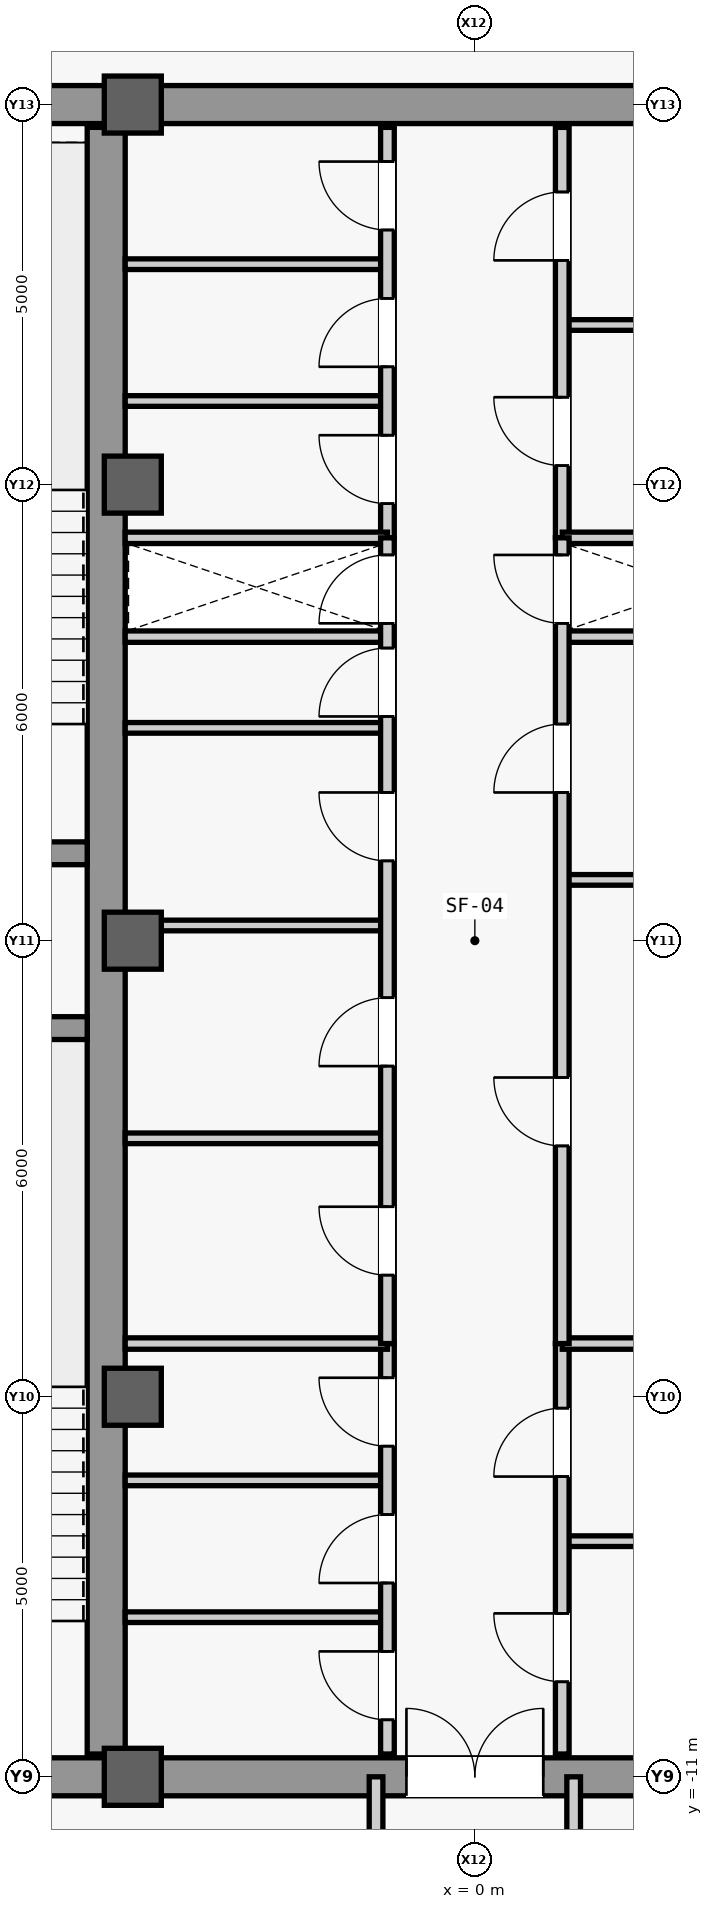
"""IFC4 building model, lengths in metres.
Left out: names, types, materials, properties, quantities, classifications, styles, units other than length and angle.
Written with IfcOpenShell. Run it as: python <this file> out.ifc"""

import sys

from ifc_helpers import new_model, si_unit, direction, frame, frame_2d, origin, origin_2d, place, context, subcontext, project, spatial, rectangle, extrude, source, transform, mapped, element, fill, save


model = new_model("IFC4")
c1 = context("Model", 3, precision=1e-05, world=origin(), true_north=direction((0.0, 1.0)))
c2 = subcontext(c1, "Body", "Model", "MODEL_VIEW")
j1 = project(units=[si_unit("LENGTHUNIT", "METRE"), si_unit("PLANEANGLEUNIT", "RADIAN")], contexts=[c1])
p1 = place(None, origin())
s1 = spatial("IfcSite", under=j1, at=p1, CompositionType="ELEMENT")
p2 = place(p1, origin())
s2 = spatial("IfcBuilding", under=s1, at=p2, CompositionType="ELEMENT")
p3 = place(p2, frame((0.0, 0.0, 358.3)))
s3 = spatial("IfcBuildingStorey", under=s2, at=p3, CompositionType="ELEMENT", Elevation=358.3)
m1 = source(origin(), c2, "Body", "SweptSolid", [
    extrude(rectangle(XDim=21.4, YDim=0.5, at=frame_2d((10.7, 0.0))), origin(), (0.0, 0.0, 1.0), 3.74),
])
p4 = place(p3, frame((-4.85, -10.7, 0.0), z_axis=(0.0, 0.0, 1.0), x_axis=(0.0, 1.0, 0.0)))
e1 = element("IfcWall", 1, at=p4, inside=s3, PredefinedType="SHEAR", context=c2, shape_type="MappedRepresentation", body=[
    mapped(m1, transform((0.0, 0.0, 0.0), scale=1.0)),
])
m2 = source(origin(), c2, "Body", "SweptSolid", [
    extrude(rectangle(XDim=5.9, YDim=0.5, at=frame_2d((2.95, 0.0))), origin(), (0.0, 0.0, 1.0), 3.74),
])
for number, where, z_axis, x_axis in (
    (2, (-10.75, -11.0, 0.0), (0.0, 0.0, 1.0), (1.0, 0.0, 0.0)),
    (3, (-10.75, 11.0, 0.0), (0.0, 0.0, 1.0), (1.0, 0.0, 0.0)),
):
    element("IfcWall", number, at=place(p3, frame(where, z_axis=z_axis, x_axis=x_axis)), inside=s3, PredefinedType="SHEAR", context=c2, shape_type="MappedRepresentation", body=[
        mapped(m2, transform((0.0, 0.0, 0.0), scale=1.0)),
    ])
m3 = source(origin(), c2, "Body", "SweptSolid", [
    extrude(rectangle(XDim=5.65, YDim=0.3, at=frame_2d((2.825, 0.0))), origin(), (0.0, 0.0, 1.0), 3.74),
])
for number, where, z_axis, x_axis in (
    (4, (-10.75, -1.15, 0.0), (0.0, 0.0, 1.0), (1.0, 0.0, 0.0)),
    (5, (-10.75, 1.15, 0.0), (0.0, 0.0, 1.0), (1.0, 0.0, 0.0)),
):
    element("IfcWall", number, at=place(p3, frame(where, z_axis=z_axis, x_axis=x_axis)), inside=s3, PredefinedType="SHEAR", context=c2, shape_type="MappedRepresentation", body=[
        mapped(m3, transform((0.0, 0.0, 0.0), scale=1.0)),
    ])
m4 = source(origin(), c2, "Body", "SweptSolid", [
    extrude(rectangle(XDim=9.2, YDim=0.5, at=frame_2d((4.6, 0.0))), origin(), (0.0, 0.0, 1.0), 3.74),
])
p5 = place(p3, frame((-4.6, -11.0, 0.0), z_axis=(0.0, 0.0, 1.0), x_axis=(1.0, 0.0, 0.0)))
e6 = element("IfcWall", 6, at=p5, inside=s3, PredefinedType="SHEAR", context=c2, shape_type="MappedRepresentation", body=[
    mapped(m4, transform((0.0, 0.0, 0.0), scale=1.0)),
])
m5 = source(origin(), c2, "Body", "SweptSolid", [
    extrude(rectangle(XDim=1.8, YDim=2.25, at=frame_2d((0.9, 1.125))), frame((0.0, 0.26, 0.0), z_axis=(0.0, -1.0, 0.0), x_axis=(1.0, 0.0, 0.0)), (0.0, 0.0, 1.0), 0.52),
])
p6 = place(p5, frame((3.7, 0.0, 0.0)))
e7 = element("IfcOpeningElement", 7, at=p6, cuts=e6, PredefinedType="OPENING", context=c2, shape_type="MappedRepresentation", body=[
    mapped(m5, transform((0.0, 0.0, 0.0), scale=1.0)),
])
p7 = place(p3, frame((-4.6, 11.0, 0.0), z_axis=(0.0, 0.0, 1.0), x_axis=(1.0, 0.0, 0.0)))
e8 = element("IfcWall", 8, at=p7, inside=s3, PredefinedType="SHEAR", context=c2, shape_type="MappedRepresentation", body=[
    mapped(m4, transform((0.0, 0.0, 0.0), scale=1.0)),
])
m6 = source(origin(), c2, "Body", "SweptSolid", [
    extrude(rectangle(XDim=0.75, YDim=0.75, at=origin_2d()), origin(), (0.0, 0.0, 1.0), 4.0),
])
for number, where, z_axis, x_axis in (
    (9, (-4.5, -11.0, 0.0), (0.0, 0.0, 1.0), (1.0, 0.0, 0.0)),
    (10, (-4.5, -6.0, 0.0), (0.0, 0.0, 1.0), (1.0, 0.0, 0.0)),
    (11, (-4.5, 0.0, 0.0), (0.0, 0.0, 1.0), (1.0, 0.0, 0.0)),
    (12, (-4.5, 6.0, 0.0), (0.0, 0.0, 1.0), (1.0, 0.0, 0.0)),
    (13, (-4.5, 11.0, 0.0), (0.0, 0.0, 1.0), (1.0, 0.0, 0.0)),
):
    element("IfcColumn", number, at=place(p3, frame(where, z_axis=z_axis, x_axis=x_axis)), inside=s3, PredefinedType="COLUMN", context=c2, shape_type="MappedRepresentation", body=[
        mapped(m6, transform((0.0, 0.0, 0.0), scale=1.0)),
    ])
m7 = source(origin(), c2, "Body", "SweptSolid", [
    extrude(rectangle(XDim=3.45, YDim=0.15, at=frame_2d((1.725, 0.0))), origin(), (0.0, 0.0, 1.0), 3.74),
])
for number, where, z_axis, x_axis in (
    (14, (-4.6, 4.0, 0.0), (0.0, 0.0, 1.0), (1.0, 0.0, 0.0)),
    (15, (1.15, 4.0, 0.0), (0.0, 0.0, 1.0), (1.0, 0.0, 0.0)),
):
    element("IfcWall", number, at=place(p3, frame(where, z_axis=z_axis, x_axis=x_axis)), inside=s3, PredefinedType="PARTITIONING", context=c2, shape_type="MappedRepresentation", body=[
        mapped(m7, transform((0.0, 0.0, 0.0), scale=1.0)),
    ])
m8 = source(origin(), c2, "Body", "SweptSolid", [
    extrude(rectangle(XDim=3.45, YDim=0.14, at=frame_2d((1.725, 0.0))), origin(), (0.0, 0.0, 1.0), 3.74),
])
for number, where, z_axis, x_axis in (
    (16, (-4.6, -8.9, 0.0), (0.0, 0.0, 1.0), (1.0, 0.0, 0.0)),
    (17, (-4.6, -7.1, 0.0), (0.0, 0.0, 1.0), (1.0, 0.0, 0.0)),
):
    element("IfcWall", number, at=place(p3, frame(where, z_axis=z_axis, x_axis=x_axis)), inside=s3, PredefinedType="PARTITIONING", context=c2, shape_type="MappedRepresentation", body=[
        mapped(m8, transform((0.0, 0.0, 0.0), scale=1.0)),
    ])
m9 = source(origin(), c2, "Body", "SweptSolid", [
    extrude(rectangle(XDim=5.4, YDim=0.18, at=frame_2d((2.7, 0.0))), origin(), (0.0, 0.0, 1.0), 3.74),
])
p8 = place(p3, frame((-1.15, -10.7, 0.0), z_axis=(0.0, 0.0, 1.0), x_axis=(0.0, 1.0, 0.0)))
e18 = element("IfcWall", 18, at=p8, inside=s3, PredefinedType="PARTITIONING", context=c2, shape_type="MappedRepresentation", body=[
    mapped(m9, transform((0.0, 0.0, 0.0), scale=1.0)),
])
m10 = source(origin(), c2, "Body", "SweptSolid", [
    extrude(rectangle(XDim=0.9, YDim=2.15, at=frame_2d((0.45, 1.075))), frame((0.0, 0.1, 0.0), z_axis=(0.0, -1.0, 0.0), x_axis=(1.0, 0.0, 0.0)), (0.0, 0.0, 1.0), 0.2),
])
p9 = place(p8, frame((0.45, 0.0, 0.0)))
e19 = element("IfcOpeningElement", 19, at=p9, cuts=e18, PredefinedType="OPENING", context=c2, shape_type="MappedRepresentation", body=[
    mapped(m10, transform((0.0, 0.0, 0.0), scale=1.0)),
])
p10 = place(p8, frame((2.25, 0.0, 0.0)))
e20 = element("IfcOpeningElement", 20, at=p10, cuts=e18, PredefinedType="OPENING", context=c2, shape_type="MappedRepresentation", body=[
    mapped(m10, transform((0.0, 0.0, 0.0), scale=1.0)),
])
p11 = place(p8, frame((4.05, 0.0, 0.0)))
e21 = element("IfcOpeningElement", 21, at=p11, cuts=e18, PredefinedType="OPENING", context=c2, shape_type="MappedRepresentation", body=[
    mapped(m10, transform((0.0, 0.0, 0.0), scale=1.0)),
])
p12 = place(p3, frame((1.15, -7.9, 0.0), z_axis=(0.0, 0.0, 1.0), x_axis=(1.0, 0.0, 0.0)))
e22 = element("IfcWall", 22, at=p12, inside=s3, PredefinedType="PARTITIONING", context=c2, shape_type="MappedRepresentation", body=[
    mapped(m8, transform((0.0, 0.0, 0.0), scale=1.0)),
])
p13 = place(p3, frame((1.15, -10.7, 0.0), z_axis=(0.0, 0.0, 1.0), x_axis=(0.0, 1.0, 0.0)))
e23 = element("IfcWall", 23, at=p13, inside=s3, PredefinedType="PARTITIONING", context=c2, shape_type="MappedRepresentation", body=[
    mapped(m9, transform((0.0, 0.0, 0.0), scale=1.0)),
])
p14 = place(p13, frame((0.95, 0.0, 0.0)))
e24 = element("IfcOpeningElement", 24, at=p14, cuts=e23, PredefinedType="OPENING", context=c2, shape_type="MappedRepresentation", body=[
    mapped(m10, transform((0.0, 0.0, 0.0), scale=1.0)),
])
p15 = place(p13, frame((3.65, 0.0, 0.0)))
e25 = element("IfcOpeningElement", 25, at=p15, cuts=e23, PredefinedType="OPENING", context=c2, shape_type="MappedRepresentation", body=[
    mapped(m10, transform((0.0, 0.0, 0.0), scale=1.0)),
])
for number, where, z_axis, x_axis in (
    (26, (-4.6, -5.3, 0.0), (0.0, 0.0, 1.0), (1.0, 0.0, 0.0)),
    (27, (1.15, -5.3, 0.0), (0.0, 0.0, 1.0), (1.0, 0.0, 0.0)),
):
    element("IfcWall", number, at=place(p3, frame(where, z_axis=z_axis, x_axis=x_axis)), inside=s3, PredefinedType="PARTITIONING", context=c2, shape_type="MappedRepresentation", body=[
        mapped(m7, transform((0.0, 0.0, 0.0), scale=1.0)),
    ])
for number, where, z_axis, x_axis in (
    (28, (-4.6, 7.1, 0.0), (0.0, 0.0, 1.0), (1.0, 0.0, 0.0)),
    (29, (-4.6, 8.9, 0.0), (0.0, 0.0, 1.0), (1.0, 0.0, 0.0)),
):
    element("IfcWall", number, at=place(p3, frame(where, z_axis=z_axis, x_axis=x_axis)), inside=s3, PredefinedType="PARTITIONING", context=c2, shape_type="MappedRepresentation", body=[
        mapped(m8, transform((0.0, 0.0, 0.0), scale=1.0)),
    ])
p16 = place(p3, frame((-1.15, 5.3, 0.0), z_axis=(0.0, 0.0, 1.0), x_axis=(0.0, 1.0, 0.0)))
e30 = element("IfcWall", 30, at=p16, inside=s3, PredefinedType="PARTITIONING", context=c2, shape_type="MappedRepresentation", body=[
    mapped(m9, transform((0.0, 0.0, 0.0), scale=1.0)),
])
p17 = place(p16, frame((0.45, 0.0, 0.0)))
e31 = element("IfcOpeningElement", 31, at=p17, cuts=e30, PredefinedType="OPENING", context=c2, shape_type="MappedRepresentation", body=[
    mapped(m10, transform((0.0, 0.0, 0.0), scale=1.0)),
])
p18 = place(p16, frame((2.25, 0.0, 0.0)))
e32 = element("IfcOpeningElement", 32, at=p18, cuts=e30, PredefinedType="OPENING", context=c2, shape_type="MappedRepresentation", body=[
    mapped(m10, transform((0.0, 0.0, 0.0), scale=1.0)),
])
p19 = place(p16, frame((4.05, 0.0, 0.0)))
e33 = element("IfcOpeningElement", 33, at=p19, cuts=e30, PredefinedType="OPENING", context=c2, shape_type="MappedRepresentation", body=[
    mapped(m10, transform((0.0, 0.0, 0.0), scale=1.0)),
])
p20 = place(p3, frame((1.15, 8.1, 0.0), z_axis=(0.0, 0.0, 1.0), x_axis=(1.0, 0.0, 0.0)))
e34 = element("IfcWall", 34, at=p20, inside=s3, PredefinedType="PARTITIONING", context=c2, shape_type="MappedRepresentation", body=[
    mapped(m8, transform((0.0, 0.0, 0.0), scale=1.0)),
])
p21 = place(p3, frame((1.15, 5.3, 0.0), z_axis=(0.0, 0.0, 1.0), x_axis=(0.0, 1.0, 0.0)))
e35 = element("IfcWall", 35, at=p21, inside=s3, PredefinedType="PARTITIONING", context=c2, shape_type="MappedRepresentation", body=[
    mapped(m9, transform((0.0, 0.0, 0.0), scale=1.0)),
])
p22 = place(p21, frame((0.95, 0.0, 0.0)))
e36 = element("IfcOpeningElement", 36, at=p22, cuts=e35, PredefinedType="OPENING", context=c2, shape_type="MappedRepresentation", body=[
    mapped(m10, transform((0.0, 0.0, 0.0), scale=1.0)),
])
p23 = place(p21, frame((3.65, 0.0, 0.0)))
e37 = element("IfcOpeningElement", 37, at=p23, cuts=e35, PredefinedType="OPENING", context=c2, shape_type="MappedRepresentation", body=[
    mapped(m10, transform((0.0, 0.0, 0.0), scale=1.0)),
])
for number, where, z_axis, x_axis in (
    (38, (-4.6, 5.3, 0.0), (0.0, 0.0, 1.0), (1.0, 0.0, 0.0)),
    (39, (1.15, 5.3, 0.0), (0.0, 0.0, 1.0), (1.0, 0.0, 0.0)),
):
    element("IfcWall", number, at=place(p3, frame(where, z_axis=z_axis, x_axis=x_axis)), inside=s3, PredefinedType="PARTITIONING", context=c2, shape_type="MappedRepresentation", body=[
        mapped(m7, transform((0.0, 0.0, 0.0), scale=1.0)),
    ])
p24 = place(p3, frame((-4.6, -2.6, 0.0), z_axis=(0.0, 0.0, 1.0), x_axis=(1.0, 0.0, 0.0)))
e40 = element("IfcWall", 40, at=p24, inside=s3, PredefinedType="PARTITIONING", context=c2, shape_type="MappedRepresentation", body=[
    mapped(m8, transform((0.0, 0.0, 0.0), scale=1.0)),
])
m11 = source(origin(), c2, "Body", "SweptSolid", [
    extrude(rectangle(XDim=3.45, YDim=0.14, at=frame_2d((1.725, 0.0))), origin(), (0.0, 0.0, 1.0), 3.045),
])
p25 = place(p3, frame((-4.6, 0.2, 0.0), z_axis=(0.0, 0.0, 1.0), x_axis=(1.0, 0.0, 0.0)))
e41 = element("IfcWall", 41, at=p25, inside=s3, PredefinedType="PARTITIONING", context=c2, shape_type="MappedRepresentation", body=[
    mapped(m11, transform((0.0, 0.0, 0.0), scale=1.0)),
])
p26 = place(p3, frame((-4.6, 2.8, 0.0), z_axis=(0.0, 0.0, 1.0), x_axis=(1.0, 0.0, 0.0)))
e42 = element("IfcWall", 42, at=p26, inside=s3, PredefinedType="PARTITIONING", context=c2, shape_type="MappedRepresentation", body=[
    mapped(m8, transform((0.0, 0.0, 0.0), scale=1.0)),
])
m12 = source(origin(), c2, "Body", "SweptSolid", [
    extrude(rectangle(XDim=10.6, YDim=0.18, at=frame_2d((5.3, 0.0))), origin(), (0.0, 0.0, 1.0), 3.74),
])
p27 = place(p3, frame((-1.15, -5.3, 0.0), z_axis=(0.0, 0.0, 1.0), x_axis=(0.0, 1.0, 0.0)))
e43 = element("IfcWall", 43, at=p27, inside=s3, PredefinedType="PARTITIONING", context=c2, shape_type="MappedRepresentation", body=[
    mapped(m12, transform((0.0, 0.0, 0.0), scale=1.0)),
])
p28 = place(p27, frame((0.9, 0.0, 0.0)))
e44 = element("IfcOpeningElement", 44, at=p28, cuts=e43, PredefinedType="OPENING", context=c2, shape_type="MappedRepresentation", body=[
    mapped(m10, transform((0.0, 0.0, 0.0), scale=1.0)),
])
p29 = place(p27, frame((3.65, 0.0, 0.0)))
e45 = element("IfcOpeningElement", 45, at=p29, cuts=e43, PredefinedType="OPENING", context=c2, shape_type="MappedRepresentation", body=[
    mapped(m10, transform((0.0, 0.0, 0.0), scale=1.0)),
])
p30 = place(p27, frame((6.35, 0.0, 0.0)))
e46 = element("IfcOpeningElement", 46, at=p30, cuts=e43, PredefinedType="OPENING", context=c2, shape_type="MappedRepresentation", body=[
    mapped(m10, transform((0.0, 0.0, 0.0), scale=1.0)),
])
p31 = place(p27, frame((8.25, 0.0, 0.0)))
e47 = element("IfcOpeningElement", 47, at=p31, cuts=e43, PredefinedType="OPENING", context=c2, shape_type="MappedRepresentation", body=[
    mapped(m10, transform((0.0, 0.0, 0.0), scale=1.0)),
])
p32 = place(p27, frame((9.475, 0.0, 0.0)))
e48 = element("IfcOpeningElement", 48, at=p32, cuts=e43, PredefinedType="OPENING", context=c2, shape_type="MappedRepresentation", body=[
    mapped(m10, transform((0.0, 0.0, 0.0), scale=1.0)),
])
p33 = place(p3, frame((1.15, 0.8, 0.0), z_axis=(0.0, 0.0, 1.0), x_axis=(1.0, 0.0, 0.0)))
e49 = element("IfcWall", 49, at=p33, inside=s3, PredefinedType="PARTITIONING", context=c2, shape_type="MappedRepresentation", body=[
    mapped(m8, transform((0.0, 0.0, 0.0), scale=1.0)),
])
p34 = place(p3, frame((1.15, -5.3, 0.0), z_axis=(0.0, 0.0, 1.0), x_axis=(0.0, 1.0, 0.0)))
e50 = element("IfcWall", 50, at=p34, inside=s3, PredefinedType="PARTITIONING", context=c2, shape_type="MappedRepresentation", body=[
    mapped(m12, transform((0.0, 0.0, 0.0), scale=1.0)),
])
p35 = place(p34, frame((2.6, 0.0, 0.0)))
e51 = element("IfcOpeningElement", 51, at=p35, cuts=e50, PredefinedType="OPENING", context=c2, shape_type="MappedRepresentation", body=[
    mapped(m10, transform((0.0, 0.0, 0.0), scale=1.0)),
])
p36 = place(p34, frame((7.25, 0.0, 0.0)))
e52 = element("IfcOpeningElement", 52, at=p36, cuts=e50, PredefinedType="OPENING", context=c2, shape_type="MappedRepresentation", body=[
    mapped(m10, transform((0.0, 0.0, 0.0), scale=1.0)),
])
p37 = place(p34, frame((9.475, 0.0, 0.0)))
e53 = element("IfcOpeningElement", 53, at=p37, cuts=e50, PredefinedType="OPENING", context=c2, shape_type="MappedRepresentation", body=[
    mapped(m10, transform((0.0, 0.0, 0.0), scale=1.0)),
])
m13 = source(origin(), c2, "Body", "SweptSolid", [
    extrude(rectangle(XDim=5.3, YDim=0.18, at=frame_2d((2.65, 0.0))), origin(), (0.0, 0.0, 1.0), 3.74),
])
for number, where, z_axis, x_axis in (
    (54, (-1.3, -16.3, 0.0), (0.0, 0.0, 1.0), (0.0, 1.0, 0.0)),
    (55, (1.3, -16.3, 0.0), (0.0, 0.0, 1.0), (0.0, 1.0, 0.0)),
):
    element("IfcWall", number, at=place(p3, frame(where, z_axis=z_axis, x_axis=x_axis)), inside=s3, PredefinedType="PARTITIONING", context=c2, shape_type="MappedRepresentation", body=[
        mapped(m13, transform((0.0, 0.0, 0.0), scale=1.0)),
    ])
m14 = source(origin(), c2, "Body", "SweptSolid", [
    extrude(rectangle(XDim=0.9, YDim=2.15, at=frame_2d((0.45, 1.075))), frame((0.0, 0.025, 0.0), z_axis=(0.0, -1.0, 0.0), x_axis=(1.0, 0.0, 0.0)), (0.0, 0.0, 1.0), 0.05),
])
p38 = place(p9, origin())
e56 = element("IfcDoor", 56, at=p38, inside=s3, OperationType="SINGLE_SWING_RIGHT", PredefinedType="DOOR", context=c2, shape_type="MappedRepresentation", body=[
    mapped(m14, transform((0.0, 0.0, 0.0), scale=1.0)),
])
fill(e19, e56)
p39 = place(p10, origin())
e57 = element("IfcDoor", 57, at=p39, inside=s3, OperationType="SINGLE_SWING_LEFT", PredefinedType="DOOR", context=c2, shape_type="MappedRepresentation", body=[
    mapped(m14, transform((0.0, 0.0, 0.0), scale=1.0)),
])
fill(e20, e57)
p40 = place(p11, origin())
e58 = element("IfcDoor", 58, at=p40, inside=s3, OperationType="SINGLE_SWING_RIGHT", PredefinedType="DOOR", context=c2, shape_type="MappedRepresentation", body=[
    mapped(m14, transform((0.0, 0.0, 0.0), scale=1.0)),
])
fill(e21, e58)
p41 = place(p14, origin())
e59 = element("IfcDoor", 59, at=p41, inside=s3, OperationType="SINGLE_SWING_RIGHT", PredefinedType="DOOR", context=c2, shape_type="MappedRepresentation", body=[
    mapped(m14, transform((0.0, 0.0, 0.0), scale=1.0)),
])
fill(e24, e59)
p42 = place(p15, origin())
e60 = element("IfcDoor", 60, at=p42, inside=s3, OperationType="SINGLE_SWING_LEFT", PredefinedType="DOOR", context=c2, shape_type="MappedRepresentation", body=[
    mapped(m14, transform((0.0, 0.0, 0.0), scale=1.0)),
])
fill(e25, e60)
m15 = source(origin(), c2, "Body", "SweptSolid", [
    extrude(rectangle(XDim=1.8, YDim=2.25, at=frame_2d((0.9, 1.125))), frame((0.0, 0.025, 0.0), z_axis=(0.0, -1.0, 0.0), x_axis=(1.0, 0.0, 0.0)), (0.0, 0.0, 1.0), 0.05),
])
p43 = place(p6, origin())
e61 = element("IfcDoor", 61, at=p43, inside=s3, OperationType="SINGLE_SWING_LEFT", PredefinedType="DOOR", context=c2, shape_type="MappedRepresentation", body=[
    mapped(m15, transform((0.0, 0.0, 0.0), scale=1.0)),
])
fill(e7, e61)
p44 = place(p17, origin())
e62 = element("IfcDoor", 62, at=p44, inside=s3, OperationType="SINGLE_SWING_RIGHT", PredefinedType="DOOR", context=c2, shape_type="MappedRepresentation", body=[
    mapped(m14, transform((0.0, 0.0, 0.0), scale=1.0)),
])
fill(e31, e62)
p45 = place(p18, origin())
e63 = element("IfcDoor", 63, at=p45, inside=s3, OperationType="SINGLE_SWING_LEFT", PredefinedType="DOOR", context=c2, shape_type="MappedRepresentation", body=[
    mapped(m14, transform((0.0, 0.0, 0.0), scale=1.0)),
])
fill(e32, e63)
p46 = place(p19, origin())
e64 = element("IfcDoor", 64, at=p46, inside=s3, OperationType="SINGLE_SWING_RIGHT", PredefinedType="DOOR", context=c2, shape_type="MappedRepresentation", body=[
    mapped(m14, transform((0.0, 0.0, 0.0), scale=1.0)),
])
fill(e33, e64)
p47 = place(p22, origin())
e65 = element("IfcDoor", 65, at=p47, inside=s3, OperationType="SINGLE_SWING_RIGHT", PredefinedType="DOOR", context=c2, shape_type="MappedRepresentation", body=[
    mapped(m14, transform((0.0, 0.0, 0.0), scale=1.0)),
])
fill(e36, e65)
p48 = place(p23, origin())
e66 = element("IfcDoor", 66, at=p48, inside=s3, OperationType="SINGLE_SWING_LEFT", PredefinedType="DOOR", context=c2, shape_type="MappedRepresentation", body=[
    mapped(m14, transform((0.0, 0.0, 0.0), scale=1.0)),
])
fill(e37, e66)
p49 = place(p28, origin())
e67 = element("IfcDoor", 67, at=p49, inside=s3, OperationType="SINGLE_SWING_RIGHT", PredefinedType="DOOR", context=c2, shape_type="MappedRepresentation", body=[
    mapped(m14, transform((0.0, 0.0, 0.0), scale=1.0)),
])
fill(e44, e67)
p50 = place(p29, origin())
e68 = element("IfcDoor", 68, at=p50, inside=s3, OperationType="SINGLE_SWING_LEFT", PredefinedType="DOOR", context=c2, shape_type="MappedRepresentation", body=[
    mapped(m14, transform((0.0, 0.0, 0.0), scale=1.0)),
])
fill(e45, e68)
p51 = place(p30, origin())
e69 = element("IfcDoor", 69, at=p51, inside=s3, OperationType="SINGLE_SWING_RIGHT", PredefinedType="DOOR", context=c2, shape_type="MappedRepresentation", body=[
    mapped(m14, transform((0.0, 0.0, 0.0), scale=1.0)),
])
fill(e46, e69)
p52 = place(p31, origin())
e70 = element("IfcDoor", 70, at=p52, inside=s3, OperationType="SINGLE_SWING_LEFT", PredefinedType="DOOR", context=c2, shape_type="MappedRepresentation", body=[
    mapped(m14, transform((0.0, 0.0, 0.0), scale=1.0)),
])
fill(e47, e70)
p53 = place(p35, origin())
e71 = element("IfcDoor", 71, at=p53, inside=s3, OperationType="SINGLE_SWING_RIGHT", PredefinedType="DOOR", context=c2, shape_type="MappedRepresentation", body=[
    mapped(m14, transform((0.0, 0.0, 0.0), scale=1.0)),
])
fill(e51, e71)
p54 = place(p36, origin())
e72 = element("IfcDoor", 72, at=p54, inside=s3, OperationType="SINGLE_SWING_LEFT", PredefinedType="DOOR", context=c2, shape_type="MappedRepresentation", body=[
    mapped(m14, transform((0.0, 0.0, 0.0), scale=1.0)),
])
fill(e52, e72)
p55 = place(p32, origin())
e73 = element("IfcDoor", 73, at=p55, inside=s3, OperationType="SINGLE_SWING_LEFT", PredefinedType="DOOR", context=c2, shape_type="MappedRepresentation", body=[
    mapped(m14, transform((0.0, 0.0, 0.0), scale=1.0)),
])
fill(e48, e73)
p56 = place(p37, origin())
e74 = element("IfcDoor", 74, at=p56, inside=s3, OperationType="SINGLE_SWING_RIGHT", PredefinedType="DOOR", context=c2, shape_type="MappedRepresentation", body=[
    mapped(m14, transform((0.0, 0.0, 0.0), scale=1.0)),
])
fill(e53, e74)
save(model, sys.argv[1])
